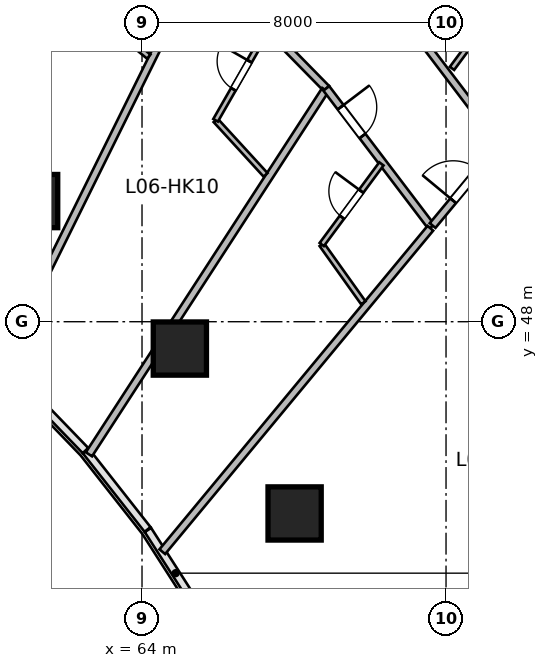
"""IFC4 building model, lengths in metres.
Left out: names, types, materials, properties, quantities, classifications, styles, units other than length and angle.
Written with IfcOpenShell. Run it as: python <this file> out.ifc"""

import sys

from ifc_helpers import new_model, si_unit, direction, frame, frame_2d, origin, origin_2d, place, context, subcontext, project, spatial, rectangle, circle, extrude, source, transform, mapped, element, fill, save


model = new_model("IFC4")
c1 = context("Model", 3, precision=1e-05, world=origin(), true_north=direction((0.0, 1.0)))
c2 = subcontext(c1, "Body", "Model", "MODEL_VIEW")
j1 = project(units=[si_unit("LENGTHUNIT", "METRE"), si_unit("PLANEANGLEUNIT", "RADIAN")], contexts=[c1])
p1 = place(None, origin())
s1 = spatial("IfcSite", under=j1, at=p1, CompositionType="ELEMENT")
p2 = place(p1, origin())
s2 = spatial("IfcBuilding", under=s1, at=p2, CompositionType="ELEMENT")
p3 = place(p2, frame((0.0, 0.0, 35.4)))
s3 = spatial("IfcBuildingStorey", under=s2, at=p3, CompositionType="ELEMENT", Elevation=35.4)
m1 = source(origin(), c2, "Body", "SweptSolid", [
    extrude(circle(Radius=0.7, at=origin_2d()), origin(), (0.0, 0.0, 1.0), 3.6),
])
for number, where, z_axis, x_axis in (
    (1, (61.082, 51.175, 0.0), (0.0, 0.0, 1.0), (0.409, 0.912, 0.0)),
    (2, (64.996, 47.294, 0.0), (0.0, 0.0, 1.0), (0.558, 0.83, 0.0)),
    (3, (68.015, 42.955, 0.0), (0.0, 0.0, 1.0), (0.691, 0.723, 0.0)),
):
    element("IfcColumn", number, at=place(p3, frame(where, z_axis=z_axis, x_axis=x_axis)), inside=s3, PredefinedType="COLUMN", context=c2, shape_type="MappedRepresentation", body=[
        mapped(m1, transform((0.0, 0.0, 0.0), scale=1.0)),
    ])
m2 = source(origin(), c2, "Body", "SweptSolid", [
    extrude(rectangle(XDim=12.196, YDim=0.195, at=frame_2d((6.098, 0.0))), origin(), (0.0, 0.0, 1.0), 3.36),
])
p4 = place(p3, frame((57.742, 48.766, 0.0), z_axis=(0.0, 0.0, 1.0), x_axis=(0.342022711534, 0.939691686031, 0.0)))
e4 = element("IfcWall", 4, at=p4, inside=s3, PredefinedType="PARTITIONING", context=c2, shape_type="MappedRepresentation", body=[
    mapped(m2, transform((0.0, 0.0, 0.0), scale=1.0)),
])
m3 = source(origin(), c2, "Body", "SweptSolid", [
    extrude(rectangle(XDim=11.844, YDim=0.195, at=frame_2d((5.922, 0.0))), origin(), (0.0, 0.0, 1.0), 3.36),
])
p5 = place(p3, frame((60.273, 46.848, 0.0), z_axis=(0.0, 0.0, 1.0), x_axis=(0.442871152218, 0.896585267854, 0.0)))
e5 = element("IfcWall", 5, at=p5, inside=s3, PredefinedType="PARTITIONING", context=c2, shape_type="MappedRepresentation", body=[
    mapped(m3, transform((0.0, 0.0, 0.0), scale=1.0)),
])
m4 = source(origin(), c2, "Body", "SweptSolid", [
    extrude(rectangle(XDim=1.873, YDim=0.14, at=frame_2d((0.937, 0.0))), origin(), (0.0, 0.0, 1.0), 3.36),
])
p6 = place(p3, frame((62.734, 56.169, 0.0), z_axis=(0.0, 0.0, 1.0), x_axis=(0.77069451688, -0.637204803537, 0.0)))
e6 = element("IfcWall", 6, at=p6, inside=s3, PredefinedType="PARTITIONING", context=c2, shape_type="MappedRepresentation", body=[
    mapped(m4, transform((0.0, 0.0, 0.0), scale=1.0)),
])
m5 = source(origin(), c2, "Body", "SweptSolid", [
    extrude(rectangle(XDim=4.724, YDim=0.195, at=frame_2d((2.362, 0.0))), origin(), (0.0, 0.0, 1.0), 3.36),
])
p7 = place(p3, frame((65.541, 57.511, 0.0), z_axis=(0.0, 0.0, 1.0), x_axis=(0.700435057457, -0.713716141253, 0.0)))
e7 = element("IfcWall", 7, at=p7, inside=s3, PredefinedType="PARTITIONING", context=c2, shape_type="MappedRepresentation", body=[
    mapped(m5, transform((0.0, 0.0, 0.0), scale=1.0)),
])
p8 = place(p7, frame((0.659, 0.0, 0.0)))
e8 = element("IfcOpeningElement", 8, at=p8, cuts=e7, PredefinedType="OPENING", context=c2, shape_type="SweptSolid", body=[
    extrude(rectangle(XDim=0.95, YDim=2.15, at=frame_2d((0.475, 1.075))), frame((0.0, 0.107, 0.0), z_axis=(0.0, -1.0, 0.0), x_axis=(1.0, 0.0, 0.0)), (0.0, 0.0, 1.0), 0.215),
])
m6 = source(origin(), c2, "Body", "SweptSolid", [
    extrude(rectangle(XDim=11.429, YDim=0.195, at=frame_2d((5.714, 0.0))), origin(), (0.0, 0.0, 1.0), 3.36),
])
p9 = place(p3, frame((62.604, 44.511, 0.0), z_axis=(0.0, 0.0, 1.0), x_axis=(0.544215487077, 0.838945471187, 0.0)))
e9 = element("IfcWall", 9, at=p9, inside=s3, PredefinedType="PARTITIONING", context=c2, shape_type="MappedRepresentation", body=[
    mapped(m6, transform((0.0, 0.0, 0.0), scale=1.0)),
])
m7 = source(origin(), c2, "Body", "SweptSolid", [
    extrude(rectangle(XDim=1.947, YDim=0.14, at=frame_2d((0.973, 0.0))), origin(), (0.0, 0.0, 1.0), 3.36),
])
p10 = place(p3, frame((65.936, 53.3, 0.0), z_axis=(0.0, 0.0, 1.0), x_axis=(0.675383794012, -0.737466426888, 0.0)))
e10 = element("IfcWall", 10, at=p10, inside=s3, PredefinedType="PARTITIONING", context=c2, shape_type="MappedRepresentation", body=[
    mapped(m7, transform((0.0, 0.0, 0.0), scale=1.0)),
])
m8 = source(origin(), c2, "Body", "SweptSolid", [
    extrude(rectangle(XDim=2.731, YDim=0.14, at=frame_2d((1.366, 0.0))), origin(), (0.0, 0.0, 1.0), 3.36),
])
p11 = place(p3, frame((65.936, 53.3, 0.0), z_axis=(0.0, 0.0, 1.0), x_axis=(0.497120404056, 0.867681568244, 0.0)))
e11 = element("IfcWall", 11, at=p11, inside=s3, PredefinedType="PARTITIONING", context=c2, shape_type="MappedRepresentation", body=[
    mapped(m8, transform((0.0, 0.0, 0.0), scale=1.0)),
])
p12 = place(p11, frame((0.941, 0.0, 0.0)))
e12 = element("IfcOpeningElement", 12, at=p12, cuts=e11, PredefinedType="OPENING", context=c2, shape_type="SweptSolid", body=[
    extrude(rectangle(XDim=0.85, YDim=2.05, at=frame_2d((0.425, 1.025))), frame((0.0, 0.08, 0.0), z_axis=(0.0, -1.0, 0.0), x_axis=(1.0, 0.0, 0.0)), (0.0, 0.0, 1.0), 0.16),
])
m9 = source(origin(), c2, "Body", "SweptSolid", [
    extrude(rectangle(XDim=4.928, YDim=0.195, at=frame_2d((2.464, 0.0))), origin(), (0.0, 0.0, 1.0), 3.36),
])
p13 = place(p3, frame((70.45, 56.607, 0.0), z_axis=(0.0, 0.0, 1.0), x_axis=(0.604793043708, -0.796382680803, 0.0)))
e13 = element("IfcWall", 13, at=p13, inside=s3, PredefinedType="PARTITIONING", context=c2, shape_type="MappedRepresentation", body=[
    mapped(m9, transform((0.0, 0.0, 0.0), scale=1.0)),
])
p14 = place(p13, frame((0.708, 0.0, 0.0)))
e14 = element("IfcOpeningElement", 14, at=p14, cuts=e13, PredefinedType="OPENING", context=c2, shape_type="SweptSolid", body=[
    extrude(rectangle(XDim=0.95, YDim=2.15, at=frame_2d((0.475, 1.075))), frame((0.0, 0.107, 0.0), z_axis=(0.0, -1.0, 0.0), x_axis=(1.0, 0.0, 0.0)), (0.0, 0.0, 1.0), 0.215),
])
m10 = source(origin(), c2, "Body", "SweptSolid", [
    extrude(rectangle(XDim=2.64, YDim=0.14, at=frame_2d((1.32, 0.0))), origin(), (0.0, 0.0, 1.0), 3.36),
])
p15 = place(p3, frame((72.157, 54.666, 0.0), z_axis=(0.0, 0.0, 1.0), x_axis=(0.594630255283, 0.803999290735, 0.0)))
e15 = element("IfcWall", 15, at=p15, inside=s3, PredefinedType="PARTITIONING", context=c2, shape_type="MappedRepresentation", body=[
    mapped(m10, transform((0.0, 0.0, 0.0), scale=1.0)),
])
p16 = place(p15, frame((0.895, 0.0, 0.0)))
e16 = element("IfcOpeningElement", 16, at=p16, cuts=e15, PredefinedType="OPENING", context=c2, shape_type="SweptSolid", body=[
    extrude(rectangle(XDim=0.85, YDim=2.05, at=frame_2d((0.425, 1.025))), frame((0.0, 0.08, 0.0), z_axis=(0.0, -1.0, 0.0), x_axis=(1.0, 0.0, 0.0)), (0.0, 0.0, 1.0), 0.16),
])
m11 = source(origin(), c2, "Body", "SweptSolid", [
    extrude(rectangle(XDim=4.576, YDim=0.195, at=frame_2d((2.288, 0.0))), origin(), (0.0, 0.0, 1.0), 3.36),
])
p17 = place(p3, frame((68.85, 54.139, 0.0), z_axis=(0.0, 0.0, 1.0), x_axis=(0.604795096156, -0.796381122118, 0.0)))
e17 = element("IfcWall", 17, at=p17, inside=s3, PredefinedType="PARTITIONING", context=c2, shape_type="MappedRepresentation", body=[
    mapped(m11, transform((0.0, 0.0, 0.0), scale=1.0)),
])
p18 = place(p17, frame((0.623, 0.0, 0.0)))
e18 = element("IfcOpeningElement", 18, at=p18, cuts=e17, PredefinedType="OPENING", context=c2, shape_type="SweptSolid", body=[
    extrude(rectangle(XDim=0.95, YDim=2.15, at=frame_2d((0.475, 1.075))), frame((0.0, 0.107, 0.0), z_axis=(0.0, -1.0, 0.0), x_axis=(1.0, 0.0, 0.0)), (0.0, 0.0, 1.0), 0.215),
])
m12 = source(origin(), c2, "Body", "SweptSolid", [
    extrude(rectangle(XDim=11.053, YDim=0.195, at=frame_2d((5.527, 0.0))), origin(), (0.0, 0.0, 1.0), 3.36),
])
p19 = place(p3, frame((64.534, 41.949, 0.0), z_axis=(0.0, 0.0, 1.0), x_axis=(0.638131235571, 0.769927611005, 0.0)))
e19 = element("IfcWall", 19, at=p19, inside=s3, PredefinedType="PARTITIONING", context=c2, shape_type="MappedRepresentation", body=[
    mapped(m12, transform((0.0, 0.0, 0.0), scale=1.0)),
])
m13 = source(origin(), c2, "Body", "SweptSolid", [
    extrude(rectangle(XDim=1.884, YDim=0.14, at=frame_2d((0.942, 0.0))), origin(), (0.0, 0.0, 1.0), 3.36),
])
p20 = place(p3, frame((68.729, 50.031, 0.0), z_axis=(0.0, 0.0, 1.0), x_axis=(0.580833492897, -0.814022391295, 0.0)))
e20 = element("IfcWall", 20, at=p20, inside=s3, PredefinedType="PARTITIONING", context=c2, shape_type="MappedRepresentation", body=[
    mapped(m13, transform((0.0, 0.0, 0.0), scale=1.0)),
])
p21 = place(p3, frame((68.729, 50.031, 0.0), z_axis=(0.0, 0.0, 1.0), x_axis=(0.594674469522, 0.803966588422, 0.0)))
e21 = element("IfcWall", 21, at=p21, inside=s3, PredefinedType="PARTITIONING", context=c2, shape_type="MappedRepresentation", body=[
    mapped(m10, transform((0.0, 0.0, 0.0), scale=1.0)),
])
p22 = place(p21, frame((0.895, 0.0, 0.0)))
e22 = element("IfcOpeningElement", 22, at=p22, cuts=e21, PredefinedType="OPENING", context=c2, shape_type="SweptSolid", body=[
    extrude(rectangle(XDim=0.85, YDim=2.05, at=frame_2d((0.425, 1.025))), frame((0.0, 0.08, 0.0), z_axis=(0.0, -1.0, 0.0), x_axis=(1.0, 0.0, 0.0)), (0.0, 0.0, 1.0), 0.16),
])
m14 = source(origin(), c2, "Body", "SweptSolid", [
    extrude(rectangle(XDim=2.748, YDim=0.195, at=frame_2d((1.374, 0.0))), origin(), (0.0, 0.0, 1.0), 3.36),
])
p23 = place(p3, frame((71.647, 50.531, 0.0), z_axis=(0.0, 0.0, 1.0), x_axis=(0.638111168284, 0.769944242729, 0.0)))
e23 = element("IfcWall", 23, at=p23, inside=s3, PredefinedType="PARTITIONING", context=c2, shape_type="MappedRepresentation", body=[
    mapped(m14, transform((0.0, 0.0, 0.0), scale=1.0)),
])
p24 = place(p23, frame((0.849, 0.0, 0.0)))
e24 = element("IfcOpeningElement", 24, at=p24, cuts=e23, PredefinedType="OPENING", context=c2, shape_type="SweptSolid", body=[
    extrude(rectangle(XDim=1.05, YDim=2.15, at=frame_2d((0.525, 1.075))), frame((0.0, 0.107, 0.0), z_axis=(0.0, -1.0, 0.0), x_axis=(1.0, 0.0, 0.0)), (0.0, 0.0, 1.0), 0.215),
])
m15 = source(origin(), c2, "Body", "SweptSolid", [
    extrude(rectangle(XDim=0.85, YDim=2.05, at=frame_2d((0.425, 1.025))), frame((0.0, 0.025, 0.0), z_axis=(0.0, -1.0, 0.0), x_axis=(1.0, 0.0, 0.0)), (0.0, 0.0, 1.0), 0.05),
])
p25 = place(p12, origin())
e25 = element("IfcDoor", 25, at=p25, inside=s3, OperationType="SINGLE_SWING_RIGHT", PredefinedType="DOOR", context=c2, shape_type="MappedRepresentation", body=[
    mapped(m15, transform((0.0, 0.0, 0.0), scale=1.0)),
])
fill(e12, e25)
m16 = source(origin(), c2, "Body", "SweptSolid", [
    extrude(rectangle(XDim=0.95, YDim=2.15, at=frame_2d((0.475, 1.075))), frame((0.0, 0.025, 0.0), z_axis=(0.0, -1.0, 0.0), x_axis=(1.0, 0.0, 0.0)), (0.0, 0.0, 1.0), 0.05),
])
p26 = place(p18, origin())
e26 = element("IfcDoor", 26, at=p26, inside=s3, OperationType="SINGLE_SWING_LEFT", PredefinedType="DOOR", context=c2, shape_type="MappedRepresentation", body=[
    mapped(m16, transform((0.0, 0.0, 0.0), scale=1.0)),
])
fill(e18, e26)
p27 = place(p22, origin())
e27 = element("IfcDoor", 27, at=p27, inside=s3, OperationType="SINGLE_SWING_RIGHT", PredefinedType="DOOR", context=c2, shape_type="MappedRepresentation", body=[
    mapped(m15, transform((0.0, 0.0, 0.0), scale=1.0)),
])
fill(e22, e27)
m17 = source(origin(), c2, "Body", "SweptSolid", [
    extrude(rectangle(XDim=1.05, YDim=2.15, at=frame_2d((0.525, 1.075))), frame((0.0, 0.025, 0.0), z_axis=(0.0, -1.0, 0.0), x_axis=(1.0, 0.0, 0.0)), (0.0, 0.0, 1.0), 0.05),
])
p28 = place(p24, origin())
e28 = element("IfcDoor", 28, at=p28, inside=s3, OperationType="SINGLE_SWING_LEFT", PredefinedType="DOOR", context=c2, shape_type="MappedRepresentation", body=[
    mapped(m17, transform((0.0, 0.0, 0.0), scale=1.0)),
])
fill(e24, e28)
save(model, sys.argv[1])
